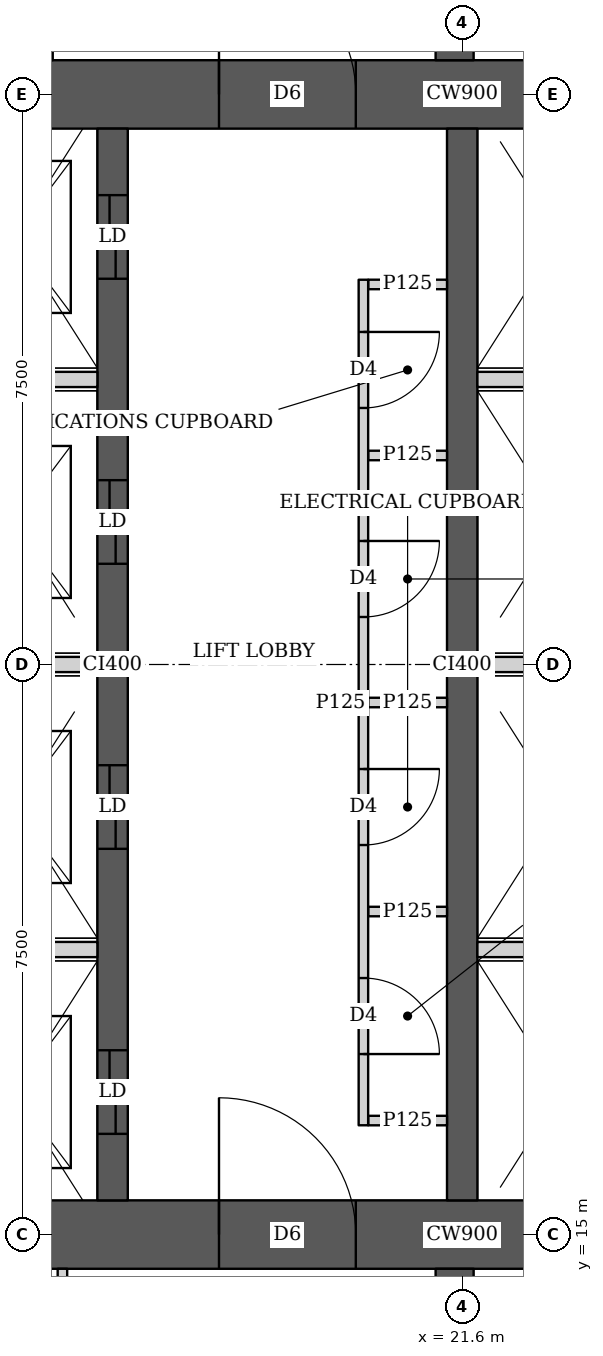
"""IFC4 building model, lengths in metres.
Left out: names, types, materials, properties, quantities, classifications, styles, units other than length and angle.
Written with IfcOpenShell. Run it as: python <this file> out.ifc"""

import sys

from ifc_helpers import new_model, si_unit, direction, frame, frame_2d, origin, place, context, subcontext, project, spatial, rectangle, extrude, element, fill, save


model = new_model("IFC4")
c1 = context("Model", 3, precision=1e-05, world=origin(), true_north=direction((0.0, 1.0)))
c2 = subcontext(c1, "Body", "Model", "MODEL_VIEW")
j1 = project(units=[si_unit("LENGTHUNIT", "METRE"), si_unit("PLANEANGLEUNIT", "RADIAN")], contexts=[c1])
p1 = place(None, origin())
s1 = spatial("IfcSite", under=j1, at=p1, CompositionType="ELEMENT")
p2 = place(p1, origin())
s2 = spatial("IfcBuilding", under=s1, at=p2, CompositionType="ELEMENT")
p3 = place(p2, frame((0.0, 0.0, 20.0)))
s3 = spatial("IfcBuildingStorey", under=s2, at=p3, CompositionType="ELEMENT", Elevation=20.0)
p4 = place(p3, frame((13.95, 15.0, 0.0), z_axis=(0.0, 0.0, 1.0), x_axis=(1.0, 0.0, 0.0)))
e1 = element("IfcWall", 1, at=p4, inside=s3, PredefinedType="SHEAR", context=c2, shape_type="SweptSolid", body=[
    extrude(rectangle(XDim=15.3, YDim=0.9, at=frame_2d((7.65, 0.0))), origin(), (0.0, 0.0, 1.0), 3.75),
])
p5 = place(p4, frame((4.45, 0.0, 0.0)))
e2 = element("IfcOpeningElement", 2, at=p5, cuts=e1, PredefinedType="OPENING", context=c2, shape_type="SweptSolid", body=[
    extrude(rectangle(XDim=1.8, YDim=2.1, at=frame_2d((0.9, 1.05))), frame((0.0, 0.46, 0.0), z_axis=(0.0, -1.0, 0.0), x_axis=(1.0, 0.0, 0.0)), (0.0, 0.0, 1.0), 0.92),
])
p6 = place(p4, frame((10.7, 0.0, 0.0)))
e3 = element("IfcOpeningElement", 3, at=p6, cuts=e1, PredefinedType="OPENING", context=c2, shape_type="SweptSolid", body=[
    extrude(rectangle(XDim=1.1, YDim=2.1, at=frame_2d((0.55, 1.05))), frame((0.0, 0.46, 0.0), z_axis=(0.0, -1.0, 0.0), x_axis=(1.0, 0.0, 0.0)), (0.0, 0.0, 1.0), 0.92),
])
p7 = place(p3, frame((13.95, 30.0, 0.0), z_axis=(0.0, 0.0, 1.0), x_axis=(1.0, 0.0, 0.0)))
e4 = element("IfcWall", 4, at=p7, inside=s3, PredefinedType="SHEAR", context=c2, shape_type="SweptSolid", body=[
    extrude(rectangle(XDim=15.3, YDim=0.9, at=frame_2d((7.65, 0.0))), origin(), (0.0, 0.0, 1.0), 3.75),
])
p8 = place(p7, frame((4.45, 0.0, 0.0)))
e5 = element("IfcOpeningElement", 5, at=p8, cuts=e4, PredefinedType="OPENING", context=c2, shape_type="SweptSolid", body=[
    extrude(rectangle(XDim=1.8, YDim=2.1, at=frame_2d((0.9, 1.05))), frame((0.0, 0.46, 0.0), z_axis=(0.0, -1.0, 0.0), x_axis=(1.0, 0.0, 0.0)), (0.0, 0.0, 1.0), 0.92),
])
p9 = place(p7, frame((10.7, 0.0, 0.0)))
e6 = element("IfcOpeningElement", 6, at=p9, cuts=e4, PredefinedType="OPENING", context=c2, shape_type="SweptSolid", body=[
    extrude(rectangle(XDim=1.1, YDim=2.1, at=frame_2d((0.55, 1.05))), frame((0.0, 0.46, 0.0), z_axis=(0.0, -1.0, 0.0), x_axis=(1.0, 0.0, 0.0)), (0.0, 0.0, 1.0), 0.92),
])
p10 = place(p3, frame((17.0, 15.45, 0.0), z_axis=(0.0, 0.0, 1.0), x_axis=(0.0, 1.0, 0.0)))
e7 = element("IfcWall", 7, at=p10, inside=s3, PredefinedType="SHEAR", context=c2, shape_type="SweptSolid", body=[
    extrude(rectangle(XDim=14.1, YDim=0.4, at=frame_2d((7.05, 0.0))), origin(), (0.0, 0.0, 1.0), 3.75),
])
p11 = place(p10, frame((0.875, 0.0, 0.0)))
e8 = element("IfcOpeningElement", 8, at=p11, cuts=e7, PredefinedType="OPENING", context=c2, shape_type="SweptSolid", body=[
    extrude(rectangle(XDim=1.1, YDim=2.1, at=frame_2d((0.55, 1.05))), frame((0.0, 0.21, 0.0), z_axis=(0.0, -1.0, 0.0), x_axis=(1.0, 0.0, 0.0)), (0.0, 0.0, 1.0), 0.42),
])
p12 = place(p10, frame((4.625, 0.0, 0.0)))
e9 = element("IfcOpeningElement", 9, at=p12, cuts=e7, PredefinedType="OPENING", context=c2, shape_type="SweptSolid", body=[
    extrude(rectangle(XDim=1.1, YDim=2.1, at=frame_2d((0.55, 1.05))), frame((0.0, 0.21, 0.0), z_axis=(0.0, -1.0, 0.0), x_axis=(1.0, 0.0, 0.0)), (0.0, 0.0, 1.0), 0.42),
])
p13 = place(p10, frame((8.375, 0.0, 0.0)))
e10 = element("IfcOpeningElement", 10, at=p13, cuts=e7, PredefinedType="OPENING", context=c2, shape_type="SweptSolid", body=[
    extrude(rectangle(XDim=1.1, YDim=2.1, at=frame_2d((0.55, 1.05))), frame((0.0, 0.21, 0.0), z_axis=(0.0, -1.0, 0.0), x_axis=(1.0, 0.0, 0.0)), (0.0, 0.0, 1.0), 0.42),
])
p14 = place(p10, frame((12.125, 0.0, 0.0)))
e11 = element("IfcOpeningElement", 11, at=p14, cuts=e7, PredefinedType="OPENING", context=c2, shape_type="SweptSolid", body=[
    extrude(rectangle(XDim=1.1, YDim=2.1, at=frame_2d((0.55, 1.05))), frame((0.0, 0.21, 0.0), z_axis=(0.0, -1.0, 0.0), x_axis=(1.0, 0.0, 0.0)), (0.0, 0.0, 1.0), 0.42),
])
p15 = place(p3, frame((21.6, 15.45, 0.0), z_axis=(0.0, 0.0, 1.0), x_axis=(0.0, 1.0, 0.0)))
e12 = element("IfcWall", 12, at=p15, inside=s3, PredefinedType="SHEAR", context=c2, shape_type="SweptSolid", body=[
    extrude(rectangle(XDim=14.1, YDim=0.4, at=frame_2d((7.05, 0.0))), origin(), (0.0, 0.0, 1.0), 3.75),
])
for number, where, z_axis, x_axis in (
    (13, (21.5, 10.35, 0.0), (0.0, 0.0, 1.0), (0.0, 1.0, 0.0)),
    (14, (21.5, 30.45, 0.0), (0.0, 0.0, 1.0), (0.0, 1.0, 0.0)),
):
    element("IfcWall", number, at=place(p3, frame(where, z_axis=z_axis, x_axis=x_axis)), inside=s3, PredefinedType="SHEAR", context=c2, shape_type="SweptSolid", body=[
        extrude(rectangle(XDim=4.2, YDim=0.5, at=frame_2d((2.1, 0.0))), origin(), (0.0, 0.0, 1.0), 3.75),
    ])
p16 = place(p3, frame((16.34, 10.413, 0.0), z_axis=(0.0, 0.0, 1.0), x_axis=(0.0, 1.0, 0.0)))
e15 = element("IfcWall", 15, at=p16, inside=s3, PredefinedType="PARTITIONING", context=c2, shape_type="SweptSolid", body=[
    extrude(rectangle(XDim=4.137, YDim=0.125, at=frame_2d((2.068, 0.0))), origin(), (0.0, 0.0, 1.0), 3.5),
])
p17 = place(p16, frame((1.512, 0.0, 0.0)))
e16 = element("IfcOpeningElement", 16, at=p17, cuts=e15, PredefinedType="OPENING", context=c2, shape_type="SweptSolid", body=[
    extrude(rectangle(XDim=1.0, YDim=2.1, at=frame_2d((0.5, 1.05))), frame((0.0, 0.073, 0.0), z_axis=(0.0, -1.0, 0.0), x_axis=(1.0, 0.0, 0.0)), (0.0, 0.0, 1.0), 0.145),
])
p18 = place(p3, frame((16.15, 30.45, 0.0), z_axis=(0.0, 0.0, 1.0), x_axis=(0.0, 1.0, 0.0)))
e17 = element("IfcWall", 17, at=p18, inside=s3, PredefinedType="PARTITIONING", context=c2, shape_type="SweptSolid", body=[
    extrude(rectangle(XDim=4.137, YDim=0.125, at=frame_2d((2.068, 0.0))), origin(), (0.0, 0.0, 1.0), 3.5),
])
p19 = place(p18, frame((1.625, 0.0, 0.0)))
e18 = element("IfcOpeningElement", 18, at=p19, cuts=e17, PredefinedType="OPENING", context=c2, shape_type="SweptSolid", body=[
    extrude(rectangle(XDim=1.0, YDim=2.1, at=frame_2d((0.5, 1.05))), frame((0.0, 0.073, 0.0), z_axis=(0.0, -1.0, 0.0), x_axis=(1.0, 0.0, 0.0)), (0.0, 0.0, 1.0), 0.145),
])
p20 = place(p3, frame((20.3, 16.438, 0.0), z_axis=(0.0, 0.0, 1.0), x_axis=(0.0, 1.0, 0.0)))
e19 = element("IfcWall", 19, at=p20, inside=s3, PredefinedType="PARTITIONING", context=c2, shape_type="SweptSolid", body=[
    extrude(rectangle(XDim=11.124, YDim=0.125, at=frame_2d((5.562, 0.0))), origin(), (0.0, 0.0, 1.0), 3.5),
])
p21 = place(p20, frame((0.937, 0.0, 0.0)))
e20 = element("IfcOpeningElement", 20, at=p21, cuts=e19, PredefinedType="OPENING", context=c2, shape_type="SweptSolid", body=[
    extrude(rectangle(XDim=1.0, YDim=2.1, at=frame_2d((0.5, 1.05))), frame((0.0, 0.073, 0.0), z_axis=(0.0, -1.0, 0.0), x_axis=(1.0, 0.0, 0.0)), (0.0, 0.0, 1.0), 0.145),
])
p22 = place(p20, frame((3.687, 0.0, 0.0)))
e21 = element("IfcOpeningElement", 21, at=p22, cuts=e19, PredefinedType="OPENING", context=c2, shape_type="SweptSolid", body=[
    extrude(rectangle(XDim=1.0, YDim=2.1, at=frame_2d((0.5, 1.05))), frame((0.0, 0.073, 0.0), z_axis=(0.0, -1.0, 0.0), x_axis=(1.0, 0.0, 0.0)), (0.0, 0.0, 1.0), 0.145),
])
p23 = place(p20, frame((6.687, 0.0, 0.0)))
e22 = element("IfcOpeningElement", 22, at=p23, cuts=e19, PredefinedType="OPENING", context=c2, shape_type="SweptSolid", body=[
    extrude(rectangle(XDim=1.0, YDim=2.1, at=frame_2d((0.5, 1.05))), frame((0.0, 0.073, 0.0), z_axis=(0.0, -1.0, 0.0), x_axis=(1.0, 0.0, 0.0)), (0.0, 0.0, 1.0), 0.145),
])
p24 = place(p20, frame((9.437, 0.0, 0.0)))
e23 = element("IfcOpeningElement", 23, at=p24, cuts=e19, PredefinedType="OPENING", context=c2, shape_type="SweptSolid", body=[
    extrude(rectangle(XDim=1.0, YDim=2.1, at=frame_2d((0.5, 1.05))), frame((0.0, 0.073, 0.0), z_axis=(0.0, -1.0, 0.0), x_axis=(1.0, 0.0, 0.0)), (0.0, 0.0, 1.0), 0.145),
])
for number, where, z_axis, x_axis in (
    (24, (20.363, 16.5, 0.0), (0.0, 0.0, 1.0), (1.0, 0.0, 0.0)),
    (25, (20.363, 27.5, 0.0), (0.0, 0.0, 1.0), (1.0, 0.0, 0.0)),
    (26, (20.363, 19.25, 0.0), (0.0, 0.0, 1.0), (1.0, 0.0, 0.0)),
    (27, (20.363, 22.0, 0.0), (0.0, 0.0, 1.0), (1.0, 0.0, 0.0)),
    (28, (20.363, 25.25, 0.0), (0.0, 0.0, 1.0), (1.0, 0.0, 0.0)),
):
    element("IfcWall", number, at=place(p3, frame(where, z_axis=z_axis, x_axis=x_axis)), inside=s3, PredefinedType="PARTITIONING", context=c2, shape_type="SweptSolid", body=[
        extrude(rectangle(XDim=1.037, YDim=0.125, at=frame_2d((0.519, 0.0))), origin(), (0.0, 0.0, 1.0), 3.5),
    ])
p25 = place(p3, frame((14.85, 18.75, 0.0), z_axis=(0.0, 0.0, 1.0), x_axis=(1.0, 0.0, 0.0)))
e29 = element("IfcWall", 29, at=p25, inside=s3, PredefinedType="SOLIDWALL", context=c2, shape_type="SweptSolid", body=[
    extrude(rectangle(XDim=1.95, YDim=0.2, at=frame_2d((0.975, 0.0))), origin(), (0.0, 0.0, 1.0), 3.5),
])
p26 = place(p3, frame((21.8, 18.75, 0.0), z_axis=(0.0, 0.0, 1.0), x_axis=(1.0, 0.0, 0.0)))
e30 = element("IfcWall", 30, at=p26, inside=s3, PredefinedType="SOLIDWALL", context=c2, shape_type="SweptSolid", body=[
    extrude(rectangle(XDim=2.2, YDim=0.2, at=frame_2d((1.1, 0.0))), origin(), (0.0, 0.0, 1.0), 3.5),
])
p27 = place(p3, frame((14.85, 22.5, 0.0), z_axis=(0.0, 0.0, 1.0), x_axis=(1.0, 0.0, 0.0)))
e31 = element("IfcWall", 31, at=p27, inside=s3, PredefinedType="SOLIDWALL", context=c2, shape_type="SweptSolid", body=[
    extrude(rectangle(XDim=1.95, YDim=0.2, at=frame_2d((0.975, 0.0))), origin(), (0.0, 0.0, 1.0), 3.5),
])
p28 = place(p3, frame((21.8, 22.5, 0.0), z_axis=(0.0, 0.0, 1.0), x_axis=(1.0, 0.0, 0.0)))
e32 = element("IfcWall", 32, at=p28, inside=s3, PredefinedType="SOLIDWALL", context=c2, shape_type="SweptSolid", body=[
    extrude(rectangle(XDim=2.2, YDim=0.2, at=frame_2d((1.1, 0.0))), origin(), (0.0, 0.0, 1.0), 3.5),
])
p29 = place(p3, frame((14.85, 26.25, 0.0), z_axis=(0.0, 0.0, 1.0), x_axis=(1.0, 0.0, 0.0)))
e33 = element("IfcWall", 33, at=p29, inside=s3, PredefinedType="SOLIDWALL", context=c2, shape_type="SweptSolid", body=[
    extrude(rectangle(XDim=1.95, YDim=0.2, at=frame_2d((0.975, 0.0))), origin(), (0.0, 0.0, 1.0), 3.5),
])
p30 = place(p3, frame((21.8, 26.25, 0.0), z_axis=(0.0, 0.0, 1.0), x_axis=(1.0, 0.0, 0.0)))
e34 = element("IfcWall", 34, at=p30, inside=s3, PredefinedType="SOLIDWALL", context=c2, shape_type="SweptSolid", body=[
    extrude(rectangle(XDim=2.2, YDim=0.2, at=frame_2d((1.1, 0.0))), origin(), (0.0, 0.0, 1.0), 3.5),
])
p31 = place(p21, origin())
e35 = element("IfcDoor", 35, at=p31, inside=s3, OperationType="SINGLE_SWING_RIGHT", PredefinedType="DOOR", context=c2, shape_type="SweptSolid", body=[
    extrude(rectangle(XDim=1.0, YDim=2.1, at=frame_2d((0.5, 1.05))), frame((0.0, 0.025, 0.0), z_axis=(0.0, -1.0, 0.0), x_axis=(1.0, 0.0, 0.0)), (0.0, 0.0, 1.0), 0.05),
])
fill(e20, e35)
p32 = place(p22, origin())
e36 = element("IfcDoor", 36, at=p32, inside=s3, OperationType="SINGLE_SWING_LEFT", PredefinedType="DOOR", context=c2, shape_type="SweptSolid", body=[
    extrude(rectangle(XDim=1.0, YDim=2.1, at=frame_2d((0.5, 1.05))), frame((0.0, 0.025, 0.0), z_axis=(0.0, -1.0, 0.0), x_axis=(1.0, 0.0, 0.0)), (0.0, 0.0, 1.0), 0.05),
])
fill(e21, e36)
p33 = place(p23, origin())
e37 = element("IfcDoor", 37, at=p33, inside=s3, OperationType="SINGLE_SWING_LEFT", PredefinedType="DOOR", context=c2, shape_type="SweptSolid", body=[
    extrude(rectangle(XDim=1.0, YDim=2.1, at=frame_2d((0.5, 1.05))), frame((0.0, 0.025, 0.0), z_axis=(0.0, -1.0, 0.0), x_axis=(1.0, 0.0, 0.0)), (0.0, 0.0, 1.0), 0.05),
])
fill(e22, e37)
p34 = place(p24, origin())
e38 = element("IfcDoor", 38, at=p34, inside=s3, OperationType="SINGLE_SWING_LEFT", PredefinedType="DOOR", context=c2, shape_type="SweptSolid", body=[
    extrude(rectangle(XDim=1.0, YDim=2.1, at=frame_2d((0.5, 1.05))), frame((0.0, 0.025, 0.0), z_axis=(0.0, -1.0, 0.0), x_axis=(1.0, 0.0, 0.0)), (0.0, 0.0, 1.0), 0.05),
])
fill(e23, e38)
p35 = place(p5, origin())
e39 = element("IfcDoor", 39, at=p35, inside=s3, OperationType="DOUBLE_DOOR_SINGLE_SWING", PredefinedType="DOOR", context=c2, shape_type="SweptSolid", body=[
    extrude(rectangle(XDim=1.8, YDim=2.1, at=frame_2d((0.9, 1.05))), frame((0.0, 0.025, 0.0), z_axis=(0.0, -1.0, 0.0), x_axis=(1.0, 0.0, 0.0)), (0.0, 0.0, 1.0), 0.05),
])
fill(e2, e39)
p36 = place(p8, origin())
e40 = element("IfcDoor", 40, at=p36, inside=s3, OperationType="DOUBLE_DOOR_SINGLE_SWING", PredefinedType="DOOR", context=c2, shape_type="SweptSolid", body=[
    extrude(rectangle(XDim=1.8, YDim=2.1, at=frame_2d((0.9, 1.05))), frame((0.0, 0.025, 0.0), z_axis=(0.0, -1.0, 0.0), x_axis=(1.0, 0.0, 0.0)), (0.0, 0.0, 1.0), 0.05),
])
fill(e5, e40)
p37 = place(p11, origin())
e41 = element("IfcDoor", 41, at=p37, inside=s3, OperationType="DOUBLE_DOOR_SLIDING", PredefinedType="DOOR", context=c2, shape_type="SweptSolid", body=[
    extrude(rectangle(XDim=1.1, YDim=2.1, at=frame_2d((0.55, 1.05))), frame((0.0, 0.025, 0.0), z_axis=(0.0, -1.0, 0.0), x_axis=(1.0, 0.0, 0.0)), (0.0, 0.0, 1.0), 0.05),
])
fill(e8, e41)
p38 = place(p12, origin())
e42 = element("IfcDoor", 42, at=p38, inside=s3, OperationType="DOUBLE_DOOR_SLIDING", PredefinedType="DOOR", context=c2, shape_type="SweptSolid", body=[
    extrude(rectangle(XDim=1.1, YDim=2.1, at=frame_2d((0.55, 1.05))), frame((0.0, 0.025, 0.0), z_axis=(0.0, -1.0, 0.0), x_axis=(1.0, 0.0, 0.0)), (0.0, 0.0, 1.0), 0.05),
])
fill(e9, e42)
p39 = place(p13, origin())
e43 = element("IfcDoor", 43, at=p39, inside=s3, OperationType="DOUBLE_DOOR_SLIDING", PredefinedType="DOOR", context=c2, shape_type="SweptSolid", body=[
    extrude(rectangle(XDim=1.1, YDim=2.1, at=frame_2d((0.55, 1.05))), frame((0.0, 0.025, 0.0), z_axis=(0.0, -1.0, 0.0), x_axis=(1.0, 0.0, 0.0)), (0.0, 0.0, 1.0), 0.05),
])
fill(e10, e43)
p40 = place(p14, origin())
e44 = element("IfcDoor", 44, at=p40, inside=s3, OperationType="DOUBLE_DOOR_SLIDING", PredefinedType="DOOR", context=c2, shape_type="SweptSolid", body=[
    extrude(rectangle(XDim=1.1, YDim=2.1, at=frame_2d((0.55, 1.05))), frame((0.0, 0.025, 0.0), z_axis=(0.0, -1.0, 0.0), x_axis=(1.0, 0.0, 0.0)), (0.0, 0.0, 1.0), 0.05),
])
fill(e11, e44)
save(model, sys.argv[1])
